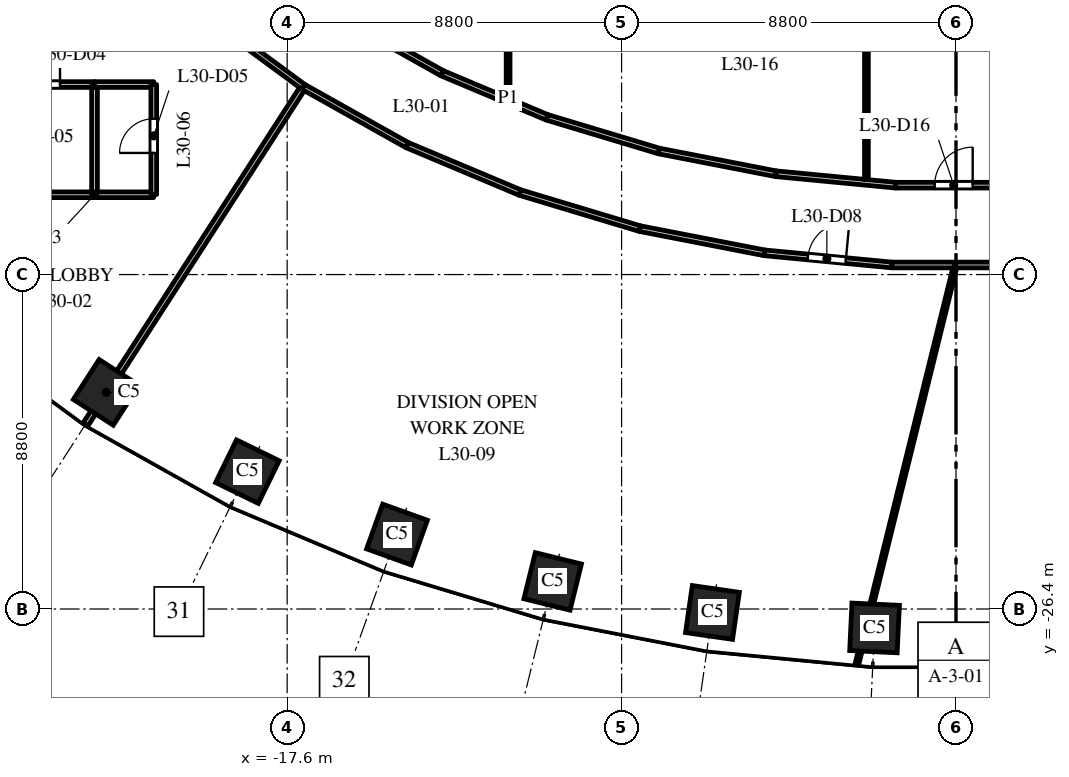
"""IFC4 building model, lengths in metres.
Left out: names, types, materials, properties, quantities, classifications, styles, units other than length and angle.
Written with IfcOpenShell. Run it as: python <this file> out.ifc"""

import sys

from ifc_helpers import new_model, si_unit, direction, frame, frame_2d, origin, origin_2d, place, context, subcontext, project, spatial, rectangle, extrude, element, fill, save


model = new_model("IFC4")
c1 = context("Model", 3, precision=1e-05, world=origin(), true_north=direction((0.0, 1.0)))
c2 = subcontext(c1, "Body", "Model", "MODEL_VIEW")
j1 = project(units=[si_unit("LENGTHUNIT", "METRE"), si_unit("PLANEANGLEUNIT", "RADIAN")], contexts=[c1])
p1 = place(None, origin())
s1 = spatial("IfcSite", under=j1, at=p1, CompositionType="ELEMENT")
p2 = place(p1, origin())
s2 = spatial("IfcBuilding", under=s1, at=p2, CompositionType="ELEMENT")
p3 = place(p2, frame((0.0, 0.0, 132.0)))
s3 = spatial("IfcBuildingStorey", under=s2, at=p3, CompositionType="ELEMENT", Elevation=132.0)
for number, where, z_axis, x_axis in (
    (1, (-22.362, -20.7, 0.0), (0.0, 0.0, 1.0), (0.84, -0.542, 0.0)),
    (2, (-18.646, -22.785, 0.0), (0.0, 0.0, 1.0), (0.898, -0.439, 0.0)),
    (3, (-14.709, -24.441, 0.0), (0.0, 0.0, 1.0), (0.941, -0.338, 0.0)),
    (4, (-10.613, -25.674, 0.0), (0.0, 0.0, 1.0), (0.971, -0.24, 0.0)),
    (5, (-6.409, -26.491, 0.0), (0.0, 0.0, 1.0), (0.99, -0.143, 0.0)),
    (6, (-2.143, -26.898, 0.0), (0.0, 0.0, 1.0), (0.999, -0.048, 0.0)),
):
    element("IfcColumn", number, at=place(p3, frame(where, z_axis=z_axis, x_axis=x_axis)), inside=s3, PredefinedType="COLUMN", context=c2, shape_type="SweptSolid", body=[
        extrude(rectangle(XDim=1.25, YDim=1.25, at=origin_2d()), origin(), (0.0, 0.0, 1.0), 4.0),
    ])
p4 = place(p3, frame((-32.063, -12.6, 0.0), z_axis=(0.0, 0.0, 1.0), x_axis=(1.0, 0.0, 0.0)))
e7 = element("IfcWall", 7, at=p4, inside=s3, PredefinedType="PARTITIONING", context=c2, shape_type="SweptSolid", body=[
    extrude(rectangle(XDim=9.394, YDim=0.15, at=frame_2d((4.697, 0.0))), origin(), (0.0, 0.0, 1.0), 2.9),
])
p5 = place(p4, frame((1.713, 0.0, 0.0)))
e8 = element("IfcOpeningElement", 8, at=p5, cuts=e7, PredefinedType="OPENING", context=c2, shape_type="SweptSolid", body=[
    extrude(rectangle(XDim=1.0, YDim=2.1, at=frame_2d((0.5, 1.05))), frame((0.0, 0.085, 0.0), z_axis=(0.0, -1.0, 0.0), x_axis=(1.0, 0.0, 0.0)), (0.0, 0.0, 1.0), 0.17),
])
p6 = place(p4, frame((7.486, 0.0, 0.0)))
e9 = element("IfcOpeningElement", 9, at=p6, cuts=e7, PredefinedType="OPENING", context=c2, shape_type="SweptSolid", body=[
    extrude(rectangle(XDim=1.0, YDim=2.1, at=frame_2d((0.5, 1.05))), frame((0.0, 0.085, 0.0), z_axis=(0.0, -1.0, 0.0), x_axis=(1.0, 0.0, 0.0)), (0.0, 0.0, 1.0), 0.17),
])
p7 = place(p3, frame((-28.933, -15.5, 0.0), z_axis=(0.0, 0.0, 1.0), x_axis=(1.0, 0.0, 0.0)))
e10 = element("IfcWall", 10, at=p7, inside=s3, PredefinedType="PARTITIONING", context=c2, shape_type="SweptSolid", body=[
    extrude(rectangle(XDim=6.264, YDim=0.15, at=frame_2d((3.132, 0.0))), origin(), (0.0, 0.0, 1.0), 2.9),
])
p8 = place(p7, frame((1.556, 0.0, 0.0)))
e11 = element("IfcOpeningElement", 11, at=p8, cuts=e10, PredefinedType="OPENING", context=c2, shape_type="SweptSolid", body=[
    extrude(rectangle(XDim=1.0, YDim=2.1, at=frame_2d((0.5, 1.05))), frame((0.0, 0.085, 0.0), z_axis=(0.0, -1.0, 0.0), x_axis=(1.0, 0.0, 0.0)), (0.0, 0.0, 1.0), 0.17),
])
p9 = place(p3, frame((-22.905, -21.542, 0.0), z_axis=(0.0, 0.0, 1.0), x_axis=(0.542214233103, 0.840240278385, 0.0)))
e12 = element("IfcWall", 12, at=p9, inside=s3, PredefinedType="PARTITIONING", context=c2, shape_type="SweptSolid", body=[
    extrude(rectangle(XDim=10.566, YDim=0.15, at=frame_2d((5.283, 0.0))), origin(), (0.0, 0.0, 1.0), 2.9),
])
p10 = place(p3, frame((-22.669, -15.5, 0.0), z_axis=(0.0, 0.0, 1.0), x_axis=(0.0, 1.0, 0.0)))
e13 = element("IfcWall", 13, at=p10, inside=s3, PredefinedType="PARTITIONING", context=c2, shape_type="SweptSolid", body=[
    extrude(rectangle(XDim=2.9, YDim=0.15, at=frame_2d((1.45, 0.0))), origin(), (0.0, 0.0, 1.0), 3.7),
])
p11 = place(p3, frame((-22.669, -15.5, 0.0), z_axis=(0.0, 0.0, 1.0), x_axis=(1.0, 0.0, 0.0)))
e14 = element("IfcWall", 14, at=p11, inside=s3, PredefinedType="PARTITIONING", context=c2, shape_type="SweptSolid", body=[
    extrude(rectangle(XDim=1.555, YDim=0.15, at=frame_2d((0.777, 0.0))), origin(), (0.0, 0.0, 1.0), 2.75),
])
p12 = place(p3, frame((-22.669, -12.6, 0.0), z_axis=(0.0, 0.0, 1.0), x_axis=(1.0, 0.0, 0.0)))
e15 = element("IfcWall", 15, at=p12, inside=s3, PredefinedType="PARTITIONING", context=c2, shape_type="SweptSolid", body=[
    extrude(rectangle(XDim=1.559, YDim=0.15, at=frame_2d((0.779, 0.0))), origin(), (0.0, 0.0, 1.0), 3.7),
])
p13 = place(p3, frame((-21.11, -15.496, 0.0), z_axis=(0.0, 0.0, 1.0), x_axis=(0.0, 1.0, 0.0)))
e16 = element("IfcWall", 16, at=p13, inside=s3, PredefinedType="PARTITIONING", context=c2, shape_type="SweptSolid", body=[
    extrude(rectangle(XDim=2.896, YDim=0.15, at=frame_2d((1.448, 0.0))), origin(), (0.0, 0.0, 1.0), 2.75),
])
p14 = place(p13, frame((1.096, 0.0, 0.0)))
e17 = element("IfcOpeningElement", 17, at=p14, cuts=e16, PredefinedType="OPENING", context=c2, shape_type="SweptSolid", body=[
    extrude(rectangle(XDim=0.9, YDim=2.1, at=frame_2d((0.45, 1.05))), frame((0.0, 0.085, 0.0), z_axis=(0.0, -1.0, 0.0), x_axis=(1.0, 0.0, 0.0)), (0.0, 0.0, 1.0), 0.17),
])
p15 = place(p3, frame((-19.595, -10.877, 0.0), z_axis=(0.0, 0.0, 1.0), x_axis=(0.805151708762, -0.593068904831, 0.0)))
e18 = element("IfcWall", 18, at=p15, inside=s3, PredefinedType="PARTITIONING", context=c2, shape_type="SweptSolid", body=[
    extrude(rectangle(XDim=3.008, YDim=0.15, at=frame_2d((1.504, 0.0))), origin(), (0.0, 0.0, 1.0), 2.75),
])
p16 = place(p3, frame((-17.173, -12.661, 0.0), z_axis=(0.0, 0.0, 1.0), x_axis=(0.872054495499, -0.489408783003, 0.0)))
e19 = element("IfcWall", 19, at=p16, inside=s3, PredefinedType="PARTITIONING", context=c2, shape_type="SweptSolid", body=[
    extrude(rectangle(XDim=3.128, YDim=0.15, at=frame_2d((1.564, 0.0))), origin(), (0.0, 0.0, 1.0), 3.7),
])
p17 = place(p3, frame((-16.032, -10.893, 0.0), z_axis=(0.0, 0.0, 1.0), x_axis=(0.871948863789, -0.489596955604, 0.0)))
e20 = element("IfcWall", 20, at=p17, inside=s3, PredefinedType="PARTITIONING", context=c2, shape_type="SweptSolid", body=[
    extrude(rectangle(XDim=2.88, YDim=0.15, at=frame_2d((1.44, 0.0))), origin(), (0.0, 0.0, 1.0), 2.75),
])
p18 = place(p3, frame((-14.445, -14.192, 0.0), z_axis=(0.0, 0.0, 1.0), x_axis=(0.921794929211, -0.387677841101, 0.0)))
e21 = element("IfcWall", 21, at=p18, inside=s3, PredefinedType="PARTITIONING", context=c2, shape_type="SweptSolid", body=[
    extrude(rectangle(XDim=3.224, YDim=0.15, at=frame_2d((1.612, 0.0))), origin(), (0.0, 0.0, 1.0), 2.85),
])
p19 = place(p3, frame((-13.521, -12.303, 0.0), z_axis=(0.0, 0.0, 1.0), x_axis=(0.921848667289, -0.387550041438, 0.0)))
e22 = element("IfcWall", 22, at=p19, inside=s3, PredefinedType="PARTITIONING", context=c2, shape_type="SweptSolid", body=[
    extrude(rectangle(XDim=2.993, YDim=0.15, at=frame_2d((1.497, 0.0))), origin(), (0.0, 0.0, 1.0), 2.85),
])
p20 = place(p3, frame((-11.786, -12.947, 0.0), z_axis=(0.0, 0.0, 1.0), x_axis=(0.0, 1.0, 0.0)))
e23 = element("IfcWall", 23, at=p20, inside=s3, PredefinedType="PARTITIONING", context=c2, shape_type="SweptSolid", body=[
    extrude(rectangle(XDim=25.894, YDim=0.1, at=frame_2d((12.947, 0.0))), origin(), (0.0, 0.0, 1.0), 2.75),
])
p21 = place(p3, frame((-11.473, -15.442, 0.0), z_axis=(0.0, 0.0, 1.0), x_axis=(0.957544199748, -0.288286499041, 0.0)))
e24 = element("IfcWall", 24, at=p21, inside=s3, PredefinedType="PARTITIONING", context=c2, shape_type="SweptSolid", body=[
    extrude(rectangle(XDim=3.293, YDim=0.15, at=frame_2d((1.646, 0.0))), origin(), (0.0, 0.0, 1.0), 3.7),
])
p22 = place(p3, frame((-10.762, -13.463, 0.0), z_axis=(0.0, 0.0, 1.0), x_axis=(0.957609782402, -0.288068576292, 0.0)))
e25 = element("IfcWall", 25, at=p22, inside=s3, PredefinedType="PARTITIONING", context=c2, shape_type="SweptSolid", body=[
    extrude(rectangle(XDim=3.076, YDim=0.15, at=frame_2d((1.538, 0.0))), origin(), (0.0, 0.0, 1.0), 3.7),
])
p23 = place(p3, frame((-8.32, -16.391, 0.0), z_axis=(0.0, 0.0, 1.0), x_axis=(0.981650748697, -0.190687722683, 0.0)))
e26 = element("IfcWall", 26, at=p23, inside=s3, PredefinedType="PARTITIONING", context=c2, shape_type="SweptSolid", body=[
    extrude(rectangle(XDim=3.34, YDim=0.15, at=frame_2d((1.67, 0.0))), origin(), (0.0, 0.0, 1.0), 2.85),
])
p24 = place(p3, frame((-7.816, -14.349, 0.0), z_axis=(0.0, 0.0, 1.0), x_axis=(0.981627147181, -0.190809181955, 0.0)))
e27 = element("IfcWall", 27, at=p24, inside=s3, PredefinedType="PARTITIONING", context=c2, shape_type="SweptSolid", body=[
    extrude(rectangle(XDim=3.134, YDim=0.15, at=frame_2d((1.567, 0.0))), origin(), (0.0, 0.0, 1.0), 2.85),
])
p25 = place(p3, frame((-5.041, -17.028, 0.0), z_axis=(0.0, 0.0, 1.0), x_axis=(0.99548178004, -0.094952754613, 0.0)))
e28 = element("IfcWall", 28, at=p25, inside=s3, PredefinedType="PARTITIONING", context=c2, shape_type="SweptSolid", body=[
    extrude(rectangle(XDim=3.368, YDim=0.15, at=frame_2d((1.684, 0.0))), origin(), (0.0, 0.0, 1.0), 3.7),
])
p26 = place(p25, frame((1.15, 0.0, 0.0)))
e29 = element("IfcOpeningElement", 29, at=p26, cuts=e28, PredefinedType="OPENING", context=c2, shape_type="SweptSolid", body=[
    extrude(rectangle(XDim=1.0, YDim=2.1, at=frame_2d((0.5, 1.05))), frame((0.0, 0.085, 0.0), z_axis=(0.0, -1.0, 0.0), x_axis=(1.0, 0.0, 0.0)), (0.0, 0.0, 1.0), 0.17),
])
p27 = place(p3, frame((-4.74, -14.947, 0.0), z_axis=(0.0, 0.0, 1.0), x_axis=(0.995467349369, -0.095103923894, 0.0)))
e30 = element("IfcWall", 30, at=p27, inside=s3, PredefinedType="PARTITIONING", context=c2, shape_type="SweptSolid", body=[
    extrude(rectangle(XDim=3.165, YDim=0.15, at=frame_2d((1.583, 0.0))), origin(), (0.0, 0.0, 1.0), 3.7),
])
p28 = place(p3, frame((-2.609, -27.858, 0.0), z_axis=(0.0, 0.0, 1.0), x_axis=(0.239863692272, 0.970806576579, 0.0)))
e31 = element("IfcWall", 31, at=p28, inside=s3, PredefinedType="PARTITIONING", context=c2, shape_type="SweptSolid", body=[
    extrude(rectangle(XDim=2.151, YDim=0.1, at=frame_2d((1.075, 0.0))), origin(), (0.0, 0.0, 1.0), 2.85),
])
p29 = place(p3, frame((-2.357, -15.096, 0.0), z_axis=(0.0, 0.0, 1.0), x_axis=(0.0, 1.0, 0.0)))
e32 = element("IfcWall", 32, at=p29, inside=s3, PredefinedType="PARTITIONING", context=c2, shape_type="SweptSolid", body=[
    extrude(rectangle(XDim=7.886, YDim=0.1, at=frame_2d((3.943, 0.0))), origin(), (0.0, 0.0, 1.0), 2.9),
])
p30 = place(p3, frame((-2.088, -25.749, 0.0), z_axis=(0.0, 0.0, 1.0), x_axis=(0.239779759728, 0.970827310506, 0.0)))
e33 = element("IfcWall", 33, at=p30, inside=s3, PredefinedType="PARTITIONING", context=c2, shape_type="SweptSolid", body=[
    extrude(rectangle(XDim=8.654, YDim=0.1, at=frame_2d((4.327, 0.0))), origin(), (0.0, 0.0, 1.0), 2.85),
])
p31 = place(p3, frame((-1.688, -17.348, 0.0), z_axis=(0.0, 0.0, 1.0), x_axis=(1.0, 0.0, 0.0)))
e34 = element("IfcWall", 34, at=p31, inside=s3, PredefinedType="PARTITIONING", context=c2, shape_type="SweptSolid", body=[
    extrude(rectangle(XDim=1.658, YDim=0.15, at=frame_2d((0.829, 0.0))), origin(), (0.0, 0.0, 1.0), 2.85),
])
p32 = place(p3, frame((-1.589, -15.248, 0.0), z_axis=(0.0, 0.0, 1.0), x_axis=(1.0, 0.0, 0.0)))
e35 = element("IfcWall", 35, at=p32, inside=s3, PredefinedType="PARTITIONING", context=c2, shape_type="SweptSolid", body=[
    extrude(rectangle(XDim=3.178, YDim=0.15, at=frame_2d((1.589, 0.0))), origin(), (0.0, 0.0, 1.0), 2.85),
])
p33 = place(p32, frame((1.028, 0.0, 0.0)))
e36 = element("IfcOpeningElement", 36, at=p33, cuts=e35, PredefinedType="OPENING", context=c2, shape_type="SweptSolid", body=[
    extrude(rectangle(XDim=1.0, YDim=2.1, at=frame_2d((0.5, 1.05))), frame((0.0, 0.085, 0.0), z_axis=(0.0, -1.0, 0.0), x_axis=(1.0, 0.0, 0.0)), (0.0, 0.0, 1.0), 0.17),
])
p34 = place(p3, frame((-0.013, -17.348, 0.0), z_axis=(0.0, 0.0, 1.0), x_axis=(1.0, 0.0, 0.0)))
e37 = element("IfcWall", 37, at=p34, inside=s3, PredefinedType="PARTITIONING", context=c2, shape_type="SweptSolid", body=[
    extrude(rectangle(XDim=1.701, YDim=0.15, at=frame_2d((0.851, 0.0))), origin(), (0.0, 0.0, 1.0), 3.7),
])
p35 = place(p6, origin())
e38 = element("IfcDoor", 38, at=p35, inside=s3, OperationType="SINGLE_SWING_RIGHT", PredefinedType="DOOR", context=c2, shape_type="SweptSolid", body=[
    extrude(rectangle(XDim=1.0, YDim=2.1, at=frame_2d((0.5, 1.05))), frame((0.0, 0.025, 0.0), z_axis=(0.0, -1.0, 0.0), x_axis=(1.0, 0.0, 0.0)), (0.0, 0.0, 1.0), 0.05),
])
fill(e9, e38)
p36 = place(p14, origin())
e39 = element("IfcDoor", 39, at=p36, inside=s3, OperationType="SINGLE_SWING_LEFT", PredefinedType="DOOR", context=c2, shape_type="SweptSolid", body=[
    extrude(rectangle(XDim=0.9, YDim=2.1, at=frame_2d((0.45, 1.05))), frame((0.0, 0.025, 0.0), z_axis=(0.0, -1.0, 0.0), x_axis=(1.0, 0.0, 0.0)), (0.0, 0.0, 1.0), 0.05),
])
fill(e17, e39)
p37 = place(p26, origin())
e40 = element("IfcDoor", 40, at=p37, inside=s3, OperationType="SINGLE_SWING_RIGHT", PredefinedType="DOOR", context=c2, shape_type="SweptSolid", body=[
    extrude(rectangle(XDim=1.0, YDim=2.1, at=frame_2d((0.5, 1.05))), frame((0.0, 0.025, 0.0), z_axis=(0.0, -1.0, 0.0), x_axis=(1.0, 0.0, 0.0)), (0.0, 0.0, 1.0), 0.05),
])
fill(e29, e40)
p38 = place(p33, origin())
e41 = element("IfcDoor", 41, at=p38, inside=s3, OperationType="SINGLE_SWING_RIGHT", PredefinedType="DOOR", context=c2, shape_type="SweptSolid", body=[
    extrude(rectangle(XDim=1.0, YDim=2.1, at=frame_2d((0.5, 1.05))), frame((0.0, 0.025, 0.0), z_axis=(0.0, -1.0, 0.0), x_axis=(1.0, 0.0, 0.0)), (0.0, 0.0, 1.0), 0.05),
])
fill(e36, e41)
save(model, sys.argv[1])
